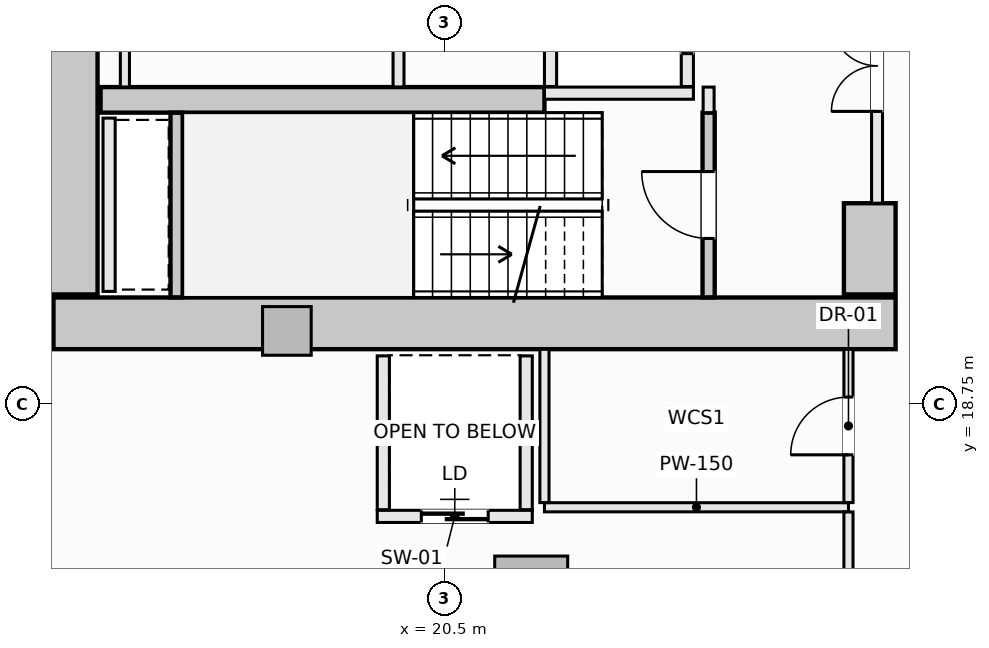
"""IFC4 building model, lengths in metres.
Left out: names, types, materials, properties, quantities, classifications, styles, units other than length and angle.
Written with IfcOpenShell. Run it as: python <this file> out.ifc"""

import sys

from ifc_helpers import new_model, si_unit, direction, frame, frame_2d, origin, origin_2d, place, context, subcontext, project, spatial, rectangle, extrude, element, fill, save


model = new_model("IFC4")
c1 = context("Model", 3, precision=1e-05, world=origin(), true_north=direction((0.0, 1.0)))
c2 = subcontext(c1, "Body", "Model", "MODEL_VIEW")
j1 = project(units=[si_unit("LENGTHUNIT", "METRE"), si_unit("PLANEANGLEUNIT", "RADIAN")], contexts=[c1])
p1 = place(None, origin())
s1 = spatial("IfcSite", under=j1, at=p1, CompositionType="ELEMENT")
p2 = place(p1, origin())
s2 = spatial("IfcBuilding", under=s1, at=p2, CompositionType="ELEMENT")
p3 = place(p2, frame((0.0, 0.0, 45.75)))
s3 = spatial("IfcBuildingStorey", under=s2, at=p3, CompositionType="ELEMENT", Elevation=45.75)
p4 = place(p3, frame((14.075, 20.075, -0.28), z_axis=(0.0, 0.0, 1.0), x_axis=(1.0, 0.0, 0.0)))
e1 = element("IfcWall", 1, at=p4, inside=s3, PredefinedType="SHEAR", context=c2, shape_type="SweptSolid", body=[
    extrude(rectangle(XDim=13.85, YDim=0.85, at=frame_2d((6.925, 0.0))), origin(), (0.0, 0.0, 1.0), 3.85),
])
p5 = place(p3, frame((14.375, 20.55, -0.28), z_axis=(0.0, 0.0, 1.0), x_axis=(0.0, 1.0, 0.0)))
e2 = element("IfcWall", 2, at=p5, inside=s3, PredefinedType="SHEAR", context=c2, shape_type="SweptSolid", body=[
    extrude(rectangle(XDim=12.9, YDim=0.85, at=frame_2d((6.45, 0.0))), origin(), (0.0, 0.0, 1.0), 3.85),
])
p6 = place(p3, frame((27.5, 20.55, -0.28), z_axis=(0.0, 0.0, 1.0), x_axis=(0.0, 1.0, 0.0)))
e3 = element("IfcWall", 3, at=p6, inside=s3, PredefinedType="SHEAR", context=c2, shape_type="SweptSolid", body=[
    extrude(rectangle(XDim=1.5, YDim=0.85, at=frame_2d((0.75, 0.0))), origin(), (0.0, 0.0, 1.0), 3.85),
])
p7 = place(p3, frame((14.85, 23.75, -0.28), z_axis=(0.0, 0.0, 1.0), x_axis=(1.0, 0.0, 0.0)))
e4 = element("IfcWall", 4, at=p7, inside=s3, PredefinedType="SHEAR", context=c2, shape_type="SweptSolid", body=[
    extrude(rectangle(XDim=7.3, YDim=0.42, at=frame_2d((3.65, 0.0))), origin(), (0.0, 0.0, 1.0), 3.85),
])
p8 = place(p3, frame((21.932, 15.648, -0.28), z_axis=(0.0, 0.0, 1.0), x_axis=(1.0, 0.0, 0.0)))
e5 = element("IfcColumn", 5, at=p8, inside=s3, PredefinedType="COLUMN", context=c2, shape_type="SweptSolid", body=[
    extrude(rectangle(XDim=1.2, YDim=1.2, at=origin_2d()), origin(), (0.0, 0.0, 1.0), 3.85),
])
p9 = place(p3, frame((17.914, 19.95, -0.28), z_axis=(0.0, 0.0, 1.0), x_axis=(1.0, 0.0, 0.0)))
e6 = element("IfcColumn", 6, at=p9, inside=s3, PredefinedType="PILASTER", context=c2, shape_type="SweptSolid", body=[
    extrude(rectangle(XDim=0.8, YDim=0.8, at=origin_2d()), origin(), (0.0, 0.0, 1.0), 3.85),
])
p10 = place(p3, frame((24.85, 20.502, -0.28), z_axis=(0.0, 0.0, 1.0), x_axis=(0.0, 1.0, 0.0)))
e7 = element("IfcWall", 7, at=p10, inside=s3, PredefinedType="SHEAR", context=c2, shape_type="SweptSolid", body=[
    extrude(rectangle(XDim=3.038, YDim=0.2, at=frame_2d((1.519, 0.0))), origin(), (0.0, 0.0, 1.0), 3.85),
])
p11 = place(p10, frame((0.969, 0.0, 0.28)))
e8 = element("IfcOpeningElement", 8, at=p11, cuts=e7, PredefinedType="OPENING", context=c2, shape_type="SweptSolid", body=[
    extrude(rectangle(XDim=1.1, YDim=2.15, at=frame_2d((0.55, 1.075))), frame((0.0, 0.11, 0.0), z_axis=(0.0, -1.0, 0.0), x_axis=(1.0, 0.0, 0.0)), (0.0, 0.0, 1.0), 0.22),
])
p12 = place(p3, frame((16.1, 20.502, -0.28), z_axis=(0.0, 0.0, 1.0), x_axis=(0.0, 1.0, 0.0)))
e9 = element("IfcWall", 9, at=p12, inside=s3, PredefinedType="SHEAR", context=c2, shape_type="SweptSolid", body=[
    extrude(rectangle(XDim=3.036, YDim=0.2, at=frame_2d((1.518, 0.0))), origin(), (0.0, 0.0, 1.0), 3.85),
])
p13 = place(p3, frame((22.15, 23.86, 0.0), z_axis=(0.0, 0.0, 1.0), x_axis=(1.0, 0.0, 0.0)))
e10 = element("IfcWall", 10, at=p13, inside=s3, PredefinedType="SOLIDWALL", context=c2, shape_type="SweptSolid", body=[
    extrude(rectangle(XDim=2.45, YDim=0.2, at=frame_2d((1.225, 0.0))), origin(), (0.0, 0.0, 1.0), 3.57),
])
p14 = place(p3, frame((22.25, 23.97, 0.0), z_axis=(0.0, 0.0, 1.0), x_axis=(0.0, 1.0, 0.0)))
e11 = element("IfcWall", 11, at=p14, inside=s3, PredefinedType="SOLIDWALL", context=c2, shape_type="SweptSolid", body=[
    extrude(rectangle(XDim=2.18, YDim=0.2, at=frame_2d((1.09, 0.0))), origin(), (0.0, 0.0, 1.0), 3.57),
])
p15 = place(p3, frame((24.5, 23.97, 0.0), z_axis=(0.0, 0.0, 1.0), x_axis=(0.0, 1.0, 0.0)))
e12 = element("IfcWall", 12, at=p15, inside=s3, PredefinedType="SOLIDWALL", context=c2, shape_type="SweptSolid", body=[
    extrude(rectangle(XDim=2.18, YDim=0.2, at=frame_2d((1.09, 0.0))), origin(), (0.0, 0.0, 1.0), 3.57),
])
p16 = place(p15, frame((0.54, 0.0, 0.0)))
e13 = element("IfcOpeningElement", 13, at=p16, cuts=e12, PredefinedType="OPENING", context=c2, shape_type="SweptSolid", body=[
    extrude(rectangle(XDim=1.1, YDim=2.2, at=frame_2d((0.55, 1.1))), frame((0.0, 0.11, 0.0), z_axis=(0.0, -1.0, 0.0), x_axis=(1.0, 0.0, 0.0)), (0.0, 0.0, 1.0), 0.22),
])
p17 = place(p3, frame((19.4, 16.9, 0.0), z_axis=(0.0, 0.0, 1.0), x_axis=(1.0, 0.0, 0.0)))
e14 = element("IfcWall", 14, at=p17, inside=s3, PredefinedType="SOLIDWALL", context=c2, shape_type="SweptSolid", body=[
    extrude(rectangle(XDim=2.55, YDim=0.2, at=frame_2d((1.275, 0.0))), origin(), (0.0, 0.0, 1.0), 3.57),
])
p18 = place(p17, frame((0.725, 0.0, 0.0)))
e15 = element("IfcOpeningElement", 15, at=p18, cuts=e14, PredefinedType="OPENING", context=c2, shape_type="SweptSolid", body=[
    extrude(rectangle(XDim=1.1, YDim=2.2, at=frame_2d((0.55, 1.1))), frame((0.0, 0.11, 0.0), z_axis=(0.0, -1.0, 0.0), x_axis=(1.0, 0.0, 0.0)), (0.0, 0.0, 1.0), 0.22),
])
for number, where, z_axis, x_axis in (
    (16, (19.5, 17.01, 0.0), (0.0, 0.0, 1.0), (0.0, 1.0, 0.0)),
    (17, (21.85, 17.01, 0.0), (0.0, 0.0, 1.0), (0.0, 1.0, 0.0)),
):
    element("IfcWall", number, at=place(p3, frame(where, z_axis=z_axis, x_axis=x_axis)), inside=s3, PredefinedType="SOLIDWALL", context=c2, shape_type="SweptSolid", body=[
        extrude(rectangle(XDim=2.53, YDim=0.2, at=frame_2d((1.265, 0.0))), origin(), (0.0, 0.0, 1.0), 3.57),
    ])
p19 = place(p3, frame((14.99, 20.6, 0.0), z_axis=(0.0, 0.0, 1.0), x_axis=(0.0, 1.0, 0.0)))
e18 = element("IfcWall", 18, at=p19, inside=s3, PredefinedType="SOLIDWALL", context=c2, shape_type="SweptSolid", body=[
    extrude(rectangle(XDim=2.85, YDim=0.2, at=frame_2d((1.425, 0.0))), origin(), (0.0, 0.0, 1.0), 3.57),
])
p20 = place(p3, frame((24.85, 23.54, 0.0), z_axis=(0.0, 0.0, 1.0), x_axis=(0.0, 1.0, 0.0)))
e19 = element("IfcWall", 19, at=p20, inside=s3, PredefinedType="SOLIDWALL", context=c2, shape_type="SweptSolid", body=[
    extrude(rectangle(XDim=0.42, YDim=0.18, at=frame_2d((0.21, 0.0))), origin(), (0.0, 0.0, 1.0), 3.57),
])
p21 = place(p3, frame((27.62, 22.05, 0.0), z_axis=(0.0, 0.0, 1.0), x_axis=(0.0, 1.0, 0.0)))
e20 = element("IfcWall", 20, at=p21, inside=s3, PredefinedType="SOLIDWALL", context=c2, shape_type="SweptSolid", body=[
    extrude(rectangle(XDim=9.9, YDim=0.18, at=frame_2d((4.95, 0.0))), origin(), (0.0, 0.0, 1.0), 2.662),
])
p22 = place(p21, frame((4.475, 0.0, 0.0)))
e21 = element("IfcOpeningElement", 21, at=p22, cuts=e20, PredefinedType="OPENING", context=c2, shape_type="SweptSolid", body=[
    extrude(rectangle(XDim=0.95, YDim=2.1, at=frame_2d((0.475, 1.05))), frame((0.0, 0.1, 0.0), z_axis=(0.0, -1.0, 0.0), x_axis=(1.0, 0.0, 0.0)), (0.0, 0.0, 1.0), 0.2),
])
p23 = place(p21, frame((6.89, 0.0, 0.0)))
e22 = element("IfcOpeningElement", 22, at=p23, cuts=e20, PredefinedType="OPENING", context=c2, shape_type="SweptSolid", body=[
    extrude(rectangle(XDim=1.5, YDim=2.2, at=frame_2d((0.75, 1.1))), frame((0.0, 0.1, 0.0), z_axis=(0.0, -1.0, 0.0), x_axis=(1.0, 0.0, 0.0)), (0.0, 0.0, 1.0), 0.2),
])
p24 = place(p21, frame((1.51, 0.0, 0.0)))
e23 = element("IfcOpeningElement", 23, at=p24, cuts=e20, PredefinedType="OPENING", context=c2, shape_type="SweptSolid", body=[
    extrude(rectangle(XDim=1.5, YDim=2.2, at=frame_2d((0.75, 1.1))), frame((0.0, 0.1, 0.0), z_axis=(0.0, -1.0, 0.0), x_axis=(1.0, 0.0, 0.0)), (0.0, 0.0, 1.0), 0.2),
])
p25 = place(p3, frame((15.25, 23.962, 0.0), z_axis=(0.0, 0.0, 1.0), x_axis=(0.0, 1.0, 0.0)))
e24 = element("IfcWall", 24, at=p25, inside=s3, PredefinedType="PARTITIONING", context=c2, shape_type="SweptSolid", body=[
    extrude(rectangle(XDim=2.106, YDim=0.15, at=frame_2d((1.053, 0.0))), origin(), (0.0, 0.0, 1.0), 3.57),
])
p26 = place(p3, frame((19.75, 23.962, 0.0), z_axis=(0.0, 0.0, 1.0), x_axis=(0.0, 1.0, 0.0)))
e25 = element("IfcWall", 25, at=p26, inside=s3, PredefinedType="SOLIDWALL", context=c2, shape_type="SweptSolid", body=[
    extrude(rectangle(XDim=2.106, YDim=0.18, at=frame_2d((1.053, 0.0))), origin(), (0.0, 0.0, 1.0), 3.57),
])
p27 = place(p3, frame((22.15, 17.05, 0.0), z_axis=(0.0, 0.0, 1.0), x_axis=(1.0, 0.0, 0.0)))
e26 = element("IfcWall", 26, at=p27, inside=s3, PredefinedType="PARTITIONING", context=c2, shape_type="SweptSolid", body=[
    extrude(rectangle(XDim=5.0, YDim=0.15, at=frame_2d((2.5, 0.0))), origin(), (0.0, 0.0, 1.0), 3.57),
])
p28 = place(p3, frame((22.15, 17.127, 0.0), z_axis=(0.0, 0.0, 1.0), x_axis=(0.0, 1.0, 0.0)))
e27 = element("IfcWall", 27, at=p28, inside=s3, PredefinedType="PARTITIONING", context=c2, shape_type="SweptSolid", body=[
    extrude(rectangle(XDim=2.521, YDim=0.15, at=frame_2d((1.26, 0.0))), origin(), (0.0, 0.0, 1.0), 3.57),
])
p29 = place(p3, frame((27.15, 11.75, 0.0), z_axis=(0.0, 0.0, 1.0), x_axis=(0.0, 1.0, 0.0)))
e28 = element("IfcWall", 28, at=p29, inside=s3, PredefinedType="PARTITIONING", context=c2, shape_type="SweptSolid", body=[
    extrude(rectangle(XDim=5.223, YDim=0.15, at=frame_2d((2.611, 0.0))), origin(), (0.0, 0.0, 1.0), 3.57),
])
p30 = place(p29, frame((2.991, 0.0, 0.0)))
e29 = element("IfcOpeningElement", 29, at=p30, cuts=e28, PredefinedType="OPENING", context=c2, shape_type="SweptSolid", body=[
    extrude(rectangle(XDim=0.95, YDim=2.1, at=frame_2d((0.475, 1.05))), frame((0.0, 0.085, 0.0), z_axis=(0.0, -1.0, 0.0), x_axis=(1.0, 0.0, 0.0)), (0.0, 0.0, 1.0), 0.17),
])
p31 = place(p3, frame((27.15, 17.127, 0.0), z_axis=(0.0, 0.0, 1.0), x_axis=(0.0, 1.0, 0.0)))
e30 = element("IfcWall", 30, at=p31, inside=s3, PredefinedType="PARTITIONING", context=c2, shape_type="SweptSolid", body=[
    extrude(rectangle(XDim=2.521, YDim=0.15, at=frame_2d((1.26, 0.0))), origin(), (0.0, 0.0, 1.0), 3.57),
])
p32 = place(p31, frame((0.785, 0.0, 0.0)))
e31 = element("IfcOpeningElement", 31, at=p32, cuts=e30, PredefinedType="OPENING", context=c2, shape_type="SweptSolid", body=[
    extrude(rectangle(XDim=0.95, YDim=2.1, at=frame_2d((0.475, 1.05))), frame((0.0, 0.085, 0.0), z_axis=(0.0, -1.0, 0.0), x_axis=(1.0, 0.0, 0.0)), (0.0, 0.0, 1.0), 0.17),
])
p33 = place(p11, origin())
e32 = element("IfcDoor", 32, at=p33, inside=s3, OperationType="SINGLE_SWING_RIGHT", PredefinedType="DOOR", context=c2, shape_type="SweptSolid", body=[
    extrude(rectangle(XDim=1.1, YDim=2.15, at=frame_2d((0.55, 1.075))), frame((0.0, 0.025, 0.0), z_axis=(0.0, -1.0, 0.0), x_axis=(1.0, 0.0, 0.0)), (0.0, 0.0, 1.0), 0.05),
])
fill(e8, e32)
p34 = place(p16, origin())
e33 = element("IfcDoor", 33, at=p34, inside=s3, OperationType="SLIDING_TO_LEFT", PredefinedType="DOOR", context=c2, shape_type="SweptSolid", body=[
    extrude(rectangle(XDim=1.1, YDim=2.2, at=frame_2d((0.55, 1.1))), frame((0.0, 0.025, 0.0), z_axis=(0.0, -1.0, 0.0), x_axis=(1.0, 0.0, 0.0)), (0.0, 0.0, 1.0), 0.05),
])
fill(e13, e33)
p35 = place(p18, origin())
e34 = element("IfcDoor", 34, at=p35, inside=s3, OperationType="SLIDING_TO_LEFT", PredefinedType="DOOR", context=c2, shape_type="SweptSolid", body=[
    extrude(rectangle(XDim=1.1, YDim=2.2, at=frame_2d((0.55, 1.1))), frame((0.0, 0.025, 0.0), z_axis=(0.0, -1.0, 0.0), x_axis=(1.0, 0.0, 0.0)), (0.0, 0.0, 1.0), 0.05),
])
fill(e15, e34)
p36 = place(p24, origin())
e35 = element("IfcDoor", 35, at=p36, inside=s3, OperationType="DOUBLE_DOOR_SINGLE_SWING", PredefinedType="DOOR", context=c2, shape_type="SweptSolid", body=[
    extrude(rectangle(XDim=1.5, YDim=2.2, at=frame_2d((0.75, 1.1))), frame((0.0, 0.025, 0.0), z_axis=(0.0, -1.0, 0.0), x_axis=(1.0, 0.0, 0.0)), (0.0, 0.0, 1.0), 0.05),
])
fill(e23, e35)
p37 = place(p32, origin())
e36 = element("IfcDoor", 36, at=p37, inside=s3, OperationType="SINGLE_SWING_LEFT", PredefinedType="DOOR", context=c2, shape_type="SweptSolid", body=[
    extrude(rectangle(XDim=0.95, YDim=2.1, at=frame_2d((0.475, 1.05))), frame((0.0, 0.025, 0.0), z_axis=(0.0, -1.0, 0.0), x_axis=(1.0, 0.0, 0.0)), (0.0, 0.0, 1.0), 0.05),
])
fill(e31, e36)
save(model, sys.argv[1])
